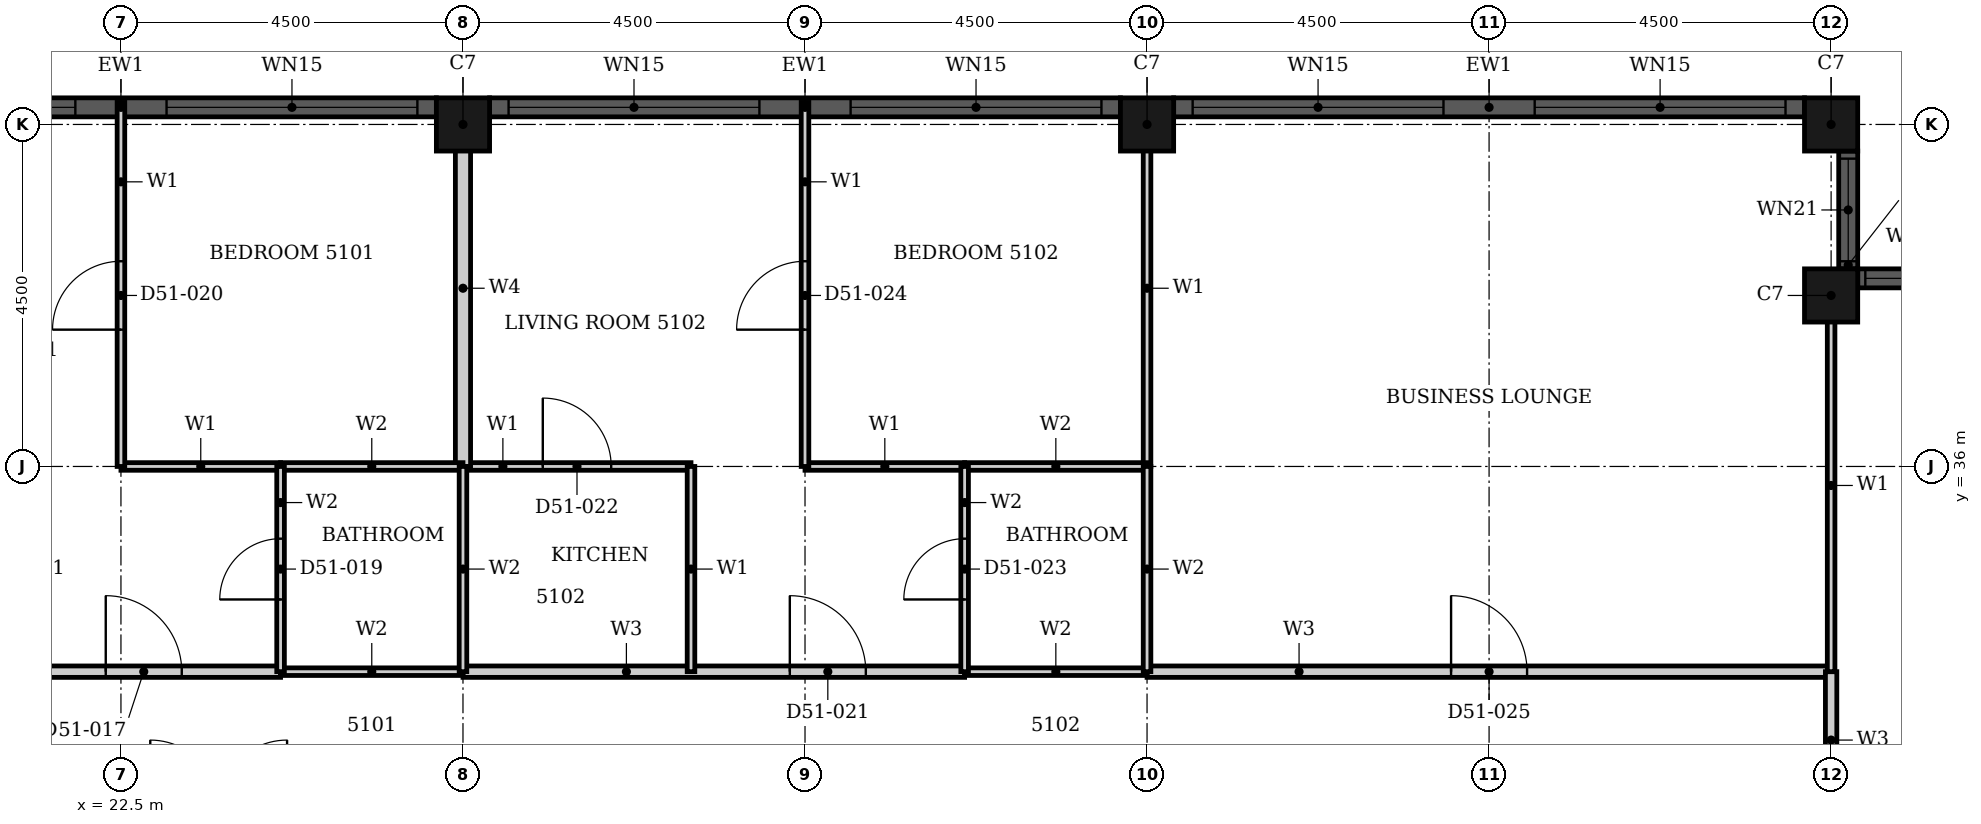
"""IFC4 building model, lengths in metres.
Left out: names, types, materials, properties, quantities, classifications, styles, units other than length and angle.
Written with IfcOpenShell. Run it as: python <this file> out.ifc"""

import sys

from ifc_helpers import new_model, si_unit, direction, frame, frame_2d, origin, origin_2d, place, context, subcontext, project, spatial, rectangle, hollow_rectangle, extrude, element, fill, save


model = new_model("IFC4")
c1 = context("Model", 3, precision=1e-05, world=origin(), true_north=direction((0.0, 1.0)))
c2 = subcontext(c1, "Body", "Model", "MODEL_VIEW")
j1 = project(units=[si_unit("LENGTHUNIT", "METRE"), si_unit("PLANEANGLEUNIT", "RADIAN")], contexts=[c1])
p1 = place(None, origin())
s1 = spatial("IfcSite", under=j1, at=p1, CompositionType="ELEMENT")
p2 = place(p1, origin())
s2 = spatial("IfcBuilding", under=s1, at=p2, CompositionType="ELEMENT")
p3 = place(p2, frame((0.0, 0.0, 203.5)))
s3 = spatial("IfcBuildingStorey", under=s2, at=p3, CompositionType="ELEMENT", Elevation=203.5)
for number, where, z_axis, x_axis in (
    (1, (45.0, 38.25, 0.0), (0.0, 0.0, 1.0), (1.0, 0.0, 0.0)),
    (2, (45.0, 40.5, 0.0), (0.0, 0.0, 1.0), (1.0, 0.0, 0.0)),
    (3, (36.0, 40.5, 0.0), (0.0, 0.0, 1.0), (1.0, 0.0, 0.0)),
    (4, (27.0, 40.5, 0.0), (0.0, 0.0, 1.0), (1.0, 0.0, 0.0)),
):
    element("IfcColumn", number, at=place(p3, frame(where, z_axis=z_axis, x_axis=x_axis)), inside=s3, PredefinedType="COLUMN", context=c2, shape_type="SweptSolid", body=[
        extrude(hollow_rectangle(XDim=0.7, YDim=0.7, WallThickness=0.022, at=origin_2d()), origin(), (0.0, 0.0, 1.0), 3.7),
    ])
p4 = place(p3, frame((46.9, 38.475, 0.0), z_axis=(0.0, 0.0, 1.0), x_axis=(-1.0, 0.0, 0.0)))
e5 = element("IfcWall", 5, at=p4, inside=s3, PredefinedType="SOLIDWALL", context=c2, shape_type="SweptSolid", body=[
    extrude(rectangle(XDim=1.55, YDim=0.25, at=frame_2d((0.775, 0.0))), origin(), (0.0, 0.0, 1.0), 3.7),
])
p5 = place(p4, frame((0.1, 0.0, 0.9)))
e6 = element("IfcOpeningElement", 6, at=p5, cuts=e5, PredefinedType="OPENING", context=c2, shape_type="SweptSolid", body=[
    extrude(rectangle(XDim=1.35, YDim=1.85, at=frame_2d((0.675, 0.925))), frame((0.0, 0.135, 0.0), z_axis=(0.0, -1.0, 0.0), x_axis=(1.0, 0.0, 0.0)), (0.0, 0.0, 1.0), 0.27),
])
p6 = place(p3, frame((45.225, 38.6, 0.0), z_axis=(0.0, 0.0, 1.0), x_axis=(0.0, 1.0, 0.0)))
e7 = element("IfcWall", 7, at=p6, inside=s3, PredefinedType="SOLIDWALL", context=c2, shape_type="SweptSolid", body=[
    extrude(rectangle(XDim=1.55, YDim=0.25, at=frame_2d((0.775, 0.0))), origin(), (0.0, 0.0, 1.0), 3.7),
])
p7 = place(p6, frame((0.1, 0.0, 0.9)))
e8 = element("IfcOpeningElement", 8, at=p7, cuts=e7, PredefinedType="OPENING", context=c2, shape_type="SweptSolid", body=[
    extrude(rectangle(XDim=1.35, YDim=1.85, at=frame_2d((0.675, 0.925))), frame((0.0, 0.135, 0.0), z_axis=(0.0, -1.0, 0.0), x_axis=(1.0, 0.0, 0.0)), (0.0, 0.0, 1.0), 0.27),
])
p8 = place(p3, frame((44.65, 40.725, 0.0), z_axis=(0.0, 0.0, 1.0), x_axis=(-1.0, 0.0, 0.0)))
e9 = element("IfcWall", 9, at=p8, inside=s3, PredefinedType="SOLIDWALL", context=c2, shape_type="SweptSolid", body=[
    extrude(rectangle(XDim=8.3, YDim=0.25, at=frame_2d((4.15, 0.0))), origin(), (0.0, 0.0, 1.0), 3.7),
])
p9 = place(p8, frame((0.25, 0.0, 0.45)))
e10 = element("IfcOpeningElement", 10, at=p9, cuts=e9, PredefinedType="OPENING", context=c2, shape_type="SweptSolid", body=[
    extrude(rectangle(XDim=3.3, YDim=2.3, at=frame_2d((1.65, 1.15))), frame((0.0, 0.135, 0.0), z_axis=(0.0, -1.0, 0.0), x_axis=(1.0, 0.0, 0.0)), (0.0, 0.0, 1.0), 0.27),
])
p10 = place(p8, frame((4.75, 0.0, 0.45)))
e11 = element("IfcOpeningElement", 11, at=p10, cuts=e9, PredefinedType="OPENING", context=c2, shape_type="SweptSolid", body=[
    extrude(rectangle(XDim=3.3, YDim=2.3, at=frame_2d((1.65, 1.15))), frame((0.0, 0.135, 0.0), z_axis=(0.0, -1.0, 0.0), x_axis=(1.0, 0.0, 0.0)), (0.0, 0.0, 1.0), 0.27),
])
p11 = place(p3, frame((35.65, 40.725, 0.0), z_axis=(0.0, 0.0, 1.0), x_axis=(-1.0, 0.0, 0.0)))
e12 = element("IfcWall", 12, at=p11, inside=s3, PredefinedType="SOLIDWALL", context=c2, shape_type="SweptSolid", body=[
    extrude(rectangle(XDim=8.3, YDim=0.25, at=frame_2d((4.15, 0.0))), origin(), (0.0, 0.0, 1.0), 3.7),
])
p12 = place(p11, frame((0.25, 0.0, 0.45)))
e13 = element("IfcOpeningElement", 13, at=p12, cuts=e12, PredefinedType="OPENING", context=c2, shape_type="SweptSolid", body=[
    extrude(rectangle(XDim=3.3, YDim=2.3, at=frame_2d((1.65, 1.15))), frame((0.0, 0.135, 0.0), z_axis=(0.0, -1.0, 0.0), x_axis=(1.0, 0.0, 0.0)), (0.0, 0.0, 1.0), 0.27),
])
p13 = place(p11, frame((4.75, 0.0, 0.45)))
e14 = element("IfcOpeningElement", 14, at=p13, cuts=e12, PredefinedType="OPENING", context=c2, shape_type="SweptSolid", body=[
    extrude(rectangle(XDim=3.3, YDim=2.3, at=frame_2d((1.65, 1.15))), frame((0.0, 0.135, 0.0), z_axis=(0.0, -1.0, 0.0), x_axis=(1.0, 0.0, 0.0)), (0.0, 0.0, 1.0), 0.27),
])
p14 = place(p3, frame((26.65, 40.725, 0.0), z_axis=(0.0, 0.0, 1.0), x_axis=(-1.0, 0.0, 0.0)))
e15 = element("IfcWall", 15, at=p14, inside=s3, PredefinedType="SOLIDWALL", context=c2, shape_type="SweptSolid", body=[
    extrude(rectangle(XDim=8.3, YDim=0.25, at=frame_2d((4.15, 0.0))), origin(), (0.0, 0.0, 1.0), 3.7),
])
p15 = place(p14, frame((0.25, 0.0, 0.45)))
e16 = element("IfcOpeningElement", 16, at=p15, cuts=e15, PredefinedType="OPENING", context=c2, shape_type="SweptSolid", body=[
    extrude(rectangle(XDim=3.3, YDim=2.3, at=frame_2d((1.65, 1.15))), frame((0.0, 0.135, 0.0), z_axis=(0.0, -1.0, 0.0), x_axis=(1.0, 0.0, 0.0)), (0.0, 0.0, 1.0), 0.27),
])
p16 = place(p14, frame((4.75, 0.0, 0.45)))
e17 = element("IfcOpeningElement", 17, at=p16, cuts=e15, PredefinedType="OPENING", context=c2, shape_type="SweptSolid", body=[
    extrude(rectangle(XDim=3.3, YDim=2.3, at=frame_2d((1.65, 1.15))), frame((0.0, 0.135, 0.0), z_axis=(0.0, -1.0, 0.0), x_axis=(1.0, 0.0, 0.0)), (0.0, 0.0, 1.0), 0.27),
])
p17 = place(p3, frame((18.0, 33.3, 0.0), z_axis=(0.0, 0.0, 1.0), x_axis=(1.0, 0.0, 0.0)))
e18 = element("IfcWall", 18, at=p17, inside=s3, PredefinedType="PARTITIONING", context=c2, shape_type="SweptSolid", body=[
    extrude(rectangle(XDim=6.6, YDim=0.15, at=frame_2d((3.3, 0.0))), origin(), (0.0, 0.0, 1.0), 3.4),
])
p18 = place(p17, frame((4.3, 0.0, 0.0)))
e19 = element("IfcOpeningElement", 19, at=p18, cuts=e18, PredefinedType="OPENING", context=c2, shape_type="SweptSolid", body=[
    extrude(rectangle(XDim=1.0, YDim=2.2, at=frame_2d((0.5, 1.1))), frame((0.0, 0.085, 0.0), z_axis=(0.0, -1.0, 0.0), x_axis=(1.0, 0.0, 0.0)), (0.0, 0.0, 1.0), 0.17),
])
p19 = place(p3, frame((27.0, 33.3, 0.0), z_axis=(0.0, 0.0, 1.0), x_axis=(1.0, 0.0, 0.0)))
e20 = element("IfcWall", 20, at=p19, inside=s3, PredefinedType="PARTITIONING", context=c2, shape_type="SweptSolid", body=[
    extrude(rectangle(XDim=6.6, YDim=0.15, at=frame_2d((3.3, 0.0))), origin(), (0.0, 0.0, 1.0), 3.4),
])
p20 = place(p19, frame((4.3, 0.0, 0.0)))
e21 = element("IfcOpeningElement", 21, at=p20, cuts=e20, PredefinedType="OPENING", context=c2, shape_type="SweptSolid", body=[
    extrude(rectangle(XDim=1.0, YDim=2.2, at=frame_2d((0.5, 1.1))), frame((0.0, 0.085, 0.0), z_axis=(0.0, -1.0, 0.0), x_axis=(1.0, 0.0, 0.0)), (0.0, 0.0, 1.0), 0.17),
])
p21 = place(p3, frame((36.0, 33.3, 0.0), z_axis=(0.0, 0.0, 1.0), x_axis=(1.0, 0.0, 0.0)))
e22 = element("IfcWall", 22, at=p21, inside=s3, PredefinedType="PARTITIONING", context=c2, shape_type="SweptSolid", body=[
    extrude(rectangle(XDim=9.0, YDim=0.15, at=frame_2d((4.5, 0.0))), origin(), (0.0, 0.0, 1.0), 3.4),
])
p22 = place(p21, frame((4.0, 0.0, 0.0)))
e23 = element("IfcOpeningElement", 23, at=p22, cuts=e22, PredefinedType="OPENING", context=c2, shape_type="SweptSolid", body=[
    extrude(rectangle(XDim=1.0, YDim=2.1, at=frame_2d((0.5, 1.05))), frame((0.0, 0.085, 0.0), z_axis=(0.0, -1.0, 0.0), x_axis=(1.0, 0.0, 0.0)), (0.0, 0.0, 1.0), 0.17),
])
p23 = place(p3, frame((45.0, 31.5, 0.0), z_axis=(0.0, 0.0, 1.0), x_axis=(0.0, 1.0, 0.0)))
e24 = element("IfcWall", 24, at=p23, inside=s3, PredefinedType="PARTITIONING", context=c2, shape_type="SweptSolid", body=[
    extrude(rectangle(XDim=1.8, YDim=0.15, at=frame_2d((0.9, 0.0))), origin(), (0.0, 0.0, 1.0), 3.4),
])
for number, where, z_axis, x_axis in (
    (25, (22.5, 36.0, 0.0), (0.0, 0.0, 1.0), (1.0, 0.0, 0.0)),
    (26, (31.5, 36.0, 0.0), (0.0, 0.0, 1.0), (1.0, 0.0, 0.0)),
):
    element("IfcWall", number, at=place(p3, frame(where, z_axis=z_axis, x_axis=x_axis)), inside=s3, PredefinedType="PARTITIONING", context=c2, shape_type="SweptSolid", body=[
        extrude(rectangle(XDim=2.1, YDim=0.1, at=frame_2d((1.05, 0.0))), origin(), (0.0, 0.0, 1.0), 3.4),
    ])
p24 = place(p3, frame((27.0, 36.0, 0.0), z_axis=(0.0, 0.0, 1.0), x_axis=(1.0, 0.0, 0.0)))
e27 = element("IfcWall", 27, at=p24, inside=s3, PredefinedType="PARTITIONING", context=c2, shape_type="SweptSolid", body=[
    extrude(rectangle(XDim=3.0, YDim=0.1, at=frame_2d((1.5, 0.0))), origin(), (0.0, 0.0, 1.0), 3.4),
])
p25 = place(p24, frame((1.05, 0.0, 0.0)))
e28 = element("IfcOpeningElement", 28, at=p25, cuts=e27, PredefinedType="OPENING", context=c2, shape_type="SweptSolid", body=[
    extrude(rectangle(XDim=0.9, YDim=2.1, at=frame_2d((0.45, 1.05))), frame((0.0, 0.06, 0.0), z_axis=(0.0, -1.0, 0.0), x_axis=(1.0, 0.0, 0.0)), (0.0, 0.0, 1.0), 0.12),
])
p26 = place(p3, frame((22.5, 36.0, 0.0), z_axis=(0.0, 0.0, 1.0), x_axis=(0.0, 1.0, 0.0)))
e29 = element("IfcWall", 29, at=p26, inside=s3, PredefinedType="PARTITIONING", context=c2, shape_type="SweptSolid", body=[
    extrude(rectangle(XDim=4.79, YDim=0.1, at=frame_2d((2.395, 0.0))), origin(), (0.0, 0.0, 1.0), 3.4),
])
p27 = place(p26, frame((1.8, 0.0, 0.0)))
e30 = element("IfcOpeningElement", 30, at=p27, cuts=e29, PredefinedType="OPENING", context=c2, shape_type="SweptSolid", body=[
    extrude(rectangle(XDim=0.9, YDim=2.1, at=frame_2d((0.45, 1.05))), frame((0.0, 0.06, 0.0), z_axis=(0.0, -1.0, 0.0), x_axis=(1.0, 0.0, 0.0)), (0.0, 0.0, 1.0), 0.12),
])
p28 = place(p3, frame((30.0, 33.3, 0.0), z_axis=(0.0, 0.0, 1.0), x_axis=(0.0, 1.0, 0.0)))
e31 = element("IfcWall", 31, at=p28, inside=s3, PredefinedType="PARTITIONING", context=c2, shape_type="SweptSolid", body=[
    extrude(rectangle(XDim=2.7, YDim=0.1, at=frame_2d((1.35, 0.0))), origin(), (0.0, 0.0, 1.0), 3.4),
])
p29 = place(p3, frame((31.5, 36.0, 0.0), z_axis=(0.0, 0.0, 1.0), x_axis=(0.0, 1.0, 0.0)))
e32 = element("IfcWall", 32, at=p29, inside=s3, PredefinedType="PARTITIONING", context=c2, shape_type="SweptSolid", body=[
    extrude(rectangle(XDim=4.79, YDim=0.1, at=frame_2d((2.395, 0.0))), origin(), (0.0, 0.0, 1.0), 3.4),
])
p30 = place(p29, frame((1.8, 0.0, 0.0)))
e33 = element("IfcOpeningElement", 33, at=p30, cuts=e32, PredefinedType="OPENING", context=c2, shape_type="SweptSolid", body=[
    extrude(rectangle(XDim=0.9, YDim=2.1, at=frame_2d((0.45, 1.05))), frame((0.0, 0.06, 0.0), z_axis=(0.0, -1.0, 0.0), x_axis=(1.0, 0.0, 0.0)), (0.0, 0.0, 1.0), 0.12),
])
p31 = place(p3, frame((36.0, 36.0, 0.0), z_axis=(0.0, 0.0, 1.0), x_axis=(0.0, 1.0, 0.0)))
e34 = element("IfcWall", 34, at=p31, inside=s3, PredefinedType="PARTITIONING", context=c2, shape_type="SweptSolid", body=[
    extrude(rectangle(XDim=4.69, YDim=0.1, at=frame_2d((2.345, 0.0))), origin(), (0.0, 0.0, 1.0), 3.4),
])
p32 = place(p3, frame((45.0, 33.3, 0.0), z_axis=(0.0, 0.0, 1.0), x_axis=(0.0, 1.0, 0.0)))
e35 = element("IfcWall", 35, at=p32, inside=s3, PredefinedType="PARTITIONING", context=c2, shape_type="SweptSolid", body=[
    extrude(rectangle(XDim=4.9, YDim=0.1, at=frame_2d((2.45, 0.0))), origin(), (0.0, 0.0, 1.0), 3.4),
])
p33 = place(p3, frame((27.0, 36.0, 0.0), z_axis=(0.0, 0.0, 1.0), x_axis=(0.0, 1.0, 0.0)))
e36 = element("IfcWall", 36, at=p33, inside=s3, PredefinedType="PARTITIONING", context=c2, shape_type="SweptSolid", body=[
    extrude(rectangle(XDim=4.69, YDim=0.2, at=frame_2d((2.345, 0.0))), origin(), (0.0, 0.0, 1.0), 3.4),
])
for number, where, z_axis, x_axis in (
    (37, (24.6, 33.3, 0.0), (0.0, 0.0, 1.0), (1.0, 0.0, 0.0)),
    (38, (33.6, 33.3, 0.0), (0.0, 0.0, 1.0), (1.0, 0.0, 0.0)),
    (39, (24.6, 36.0, 0.0), (0.0, 0.0, 1.0), (1.0, 0.0, 0.0)),
    (40, (33.6, 36.0, 0.0), (0.0, 0.0, 1.0), (1.0, 0.0, 0.0)),
):
    element("IfcWall", number, at=place(p3, frame(where, z_axis=z_axis, x_axis=x_axis)), inside=s3, PredefinedType="PARTITIONING", context=c2, shape_type="SweptSolid", body=[
        extrude(rectangle(XDim=2.4, YDim=0.1, at=frame_2d((1.2, 0.0))), origin(), (0.0, 0.0, 1.0), 3.4),
    ])
p34 = place(p3, frame((24.6, 33.3, 0.0), z_axis=(0.0, 0.0, 1.0), x_axis=(0.0, 1.0, 0.0)))
e41 = element("IfcWall", 41, at=p34, inside=s3, PredefinedType="PARTITIONING", context=c2, shape_type="SweptSolid", body=[
    extrude(rectangle(XDim=2.7, YDim=0.1, at=frame_2d((1.35, 0.0))), origin(), (0.0, 0.0, 1.0), 3.4),
])
p35 = place(p34, frame((0.95, 0.0, 0.0)))
e42 = element("IfcOpeningElement", 42, at=p35, cuts=e41, PredefinedType="OPENING", context=c2, shape_type="SweptSolid", body=[
    extrude(rectangle(XDim=0.8, YDim=2.1, at=frame_2d((0.4, 1.05))), frame((0.0, 0.06, 0.0), z_axis=(0.0, -1.0, 0.0), x_axis=(1.0, 0.0, 0.0)), (0.0, 0.0, 1.0), 0.12),
])
p36 = place(p3, frame((27.0, 33.3, 0.0), z_axis=(0.0, 0.0, 1.0), x_axis=(0.0, 1.0, 0.0)))
e43 = element("IfcWall", 43, at=p36, inside=s3, PredefinedType="PARTITIONING", context=c2, shape_type="SweptSolid", body=[
    extrude(rectangle(XDim=2.7, YDim=0.1, at=frame_2d((1.35, 0.0))), origin(), (0.0, 0.0, 1.0), 3.4),
])
p37 = place(p3, frame((33.6, 33.3, 0.0), z_axis=(0.0, 0.0, 1.0), x_axis=(0.0, 1.0, 0.0)))
e44 = element("IfcWall", 44, at=p37, inside=s3, PredefinedType="PARTITIONING", context=c2, shape_type="SweptSolid", body=[
    extrude(rectangle(XDim=2.7, YDim=0.1, at=frame_2d((1.35, 0.0))), origin(), (0.0, 0.0, 1.0), 3.4),
])
p38 = place(p37, frame((0.95, 0.0, 0.0)))
e45 = element("IfcOpeningElement", 45, at=p38, cuts=e44, PredefinedType="OPENING", context=c2, shape_type="SweptSolid", body=[
    extrude(rectangle(XDim=0.8, YDim=2.1, at=frame_2d((0.4, 1.05))), frame((0.0, 0.06, 0.0), z_axis=(0.0, -1.0, 0.0), x_axis=(1.0, 0.0, 0.0)), (0.0, 0.0, 1.0), 0.12),
])
p39 = place(p3, frame((36.0, 33.3, 0.0), z_axis=(0.0, 0.0, 1.0), x_axis=(0.0, 1.0, 0.0)))
e46 = element("IfcWall", 46, at=p39, inside=s3, PredefinedType="PARTITIONING", context=c2, shape_type="SweptSolid", body=[
    extrude(rectangle(XDim=2.7, YDim=0.1, at=frame_2d((1.35, 0.0))), origin(), (0.0, 0.0, 1.0), 3.4),
])
p40 = place(p5, origin())
e47 = element("IfcWindow", 47, at=p40, inside=s3, PartitioningType="SINGLE_PANEL", PredefinedType="WINDOW", context=c2, shape_type="SweptSolid", body=[
    extrude(rectangle(XDim=1.35, YDim=1.85, at=frame_2d((0.675, 0.925))), frame((0.0, 0.03, 0.0), z_axis=(0.0, -1.0, 0.0), x_axis=(1.0, 0.0, 0.0)), (0.0, 0.0, 1.0), 0.06),
])
fill(e6, e47)
p41 = place(p7, origin())
e48 = element("IfcWindow", 48, at=p41, inside=s3, PartitioningType="SINGLE_PANEL", PredefinedType="WINDOW", context=c2, shape_type="SweptSolid", body=[
    extrude(rectangle(XDim=1.35, YDim=1.85, at=frame_2d((0.675, 0.925))), frame((0.0, 0.03, 0.0), z_axis=(0.0, -1.0, 0.0), x_axis=(1.0, 0.0, 0.0)), (0.0, 0.0, 1.0), 0.06),
])
fill(e8, e48)
p42 = place(p9, origin())
e49 = element("IfcWindow", 49, at=p42, inside=s3, PartitioningType="SINGLE_PANEL", PredefinedType="WINDOW", context=c2, shape_type="SweptSolid", body=[
    extrude(rectangle(XDim=3.3, YDim=2.3, at=frame_2d((1.65, 1.15))), frame((0.0, 0.03, 0.0), z_axis=(0.0, -1.0, 0.0), x_axis=(1.0, 0.0, 0.0)), (0.0, 0.0, 1.0), 0.06),
])
fill(e10, e49)
p43 = place(p10, origin())
e50 = element("IfcWindow", 50, at=p43, inside=s3, PartitioningType="SINGLE_PANEL", PredefinedType="WINDOW", context=c2, shape_type="SweptSolid", body=[
    extrude(rectangle(XDim=3.3, YDim=2.3, at=frame_2d((1.65, 1.15))), frame((0.0, 0.03, 0.0), z_axis=(0.0, -1.0, 0.0), x_axis=(1.0, 0.0, 0.0)), (0.0, 0.0, 1.0), 0.06),
])
fill(e11, e50)
p44 = place(p12, origin())
e51 = element("IfcWindow", 51, at=p44, inside=s3, PartitioningType="SINGLE_PANEL", PredefinedType="WINDOW", context=c2, shape_type="SweptSolid", body=[
    extrude(rectangle(XDim=3.3, YDim=2.3, at=frame_2d((1.65, 1.15))), frame((0.0, 0.03, 0.0), z_axis=(0.0, -1.0, 0.0), x_axis=(1.0, 0.0, 0.0)), (0.0, 0.0, 1.0), 0.06),
])
fill(e13, e51)
p45 = place(p13, origin())
e52 = element("IfcWindow", 52, at=p45, inside=s3, PartitioningType="SINGLE_PANEL", PredefinedType="WINDOW", context=c2, shape_type="SweptSolid", body=[
    extrude(rectangle(XDim=3.3, YDim=2.3, at=frame_2d((1.65, 1.15))), frame((0.0, 0.03, 0.0), z_axis=(0.0, -1.0, 0.0), x_axis=(1.0, 0.0, 0.0)), (0.0, 0.0, 1.0), 0.06),
])
fill(e14, e52)
p46 = place(p15, origin())
e53 = element("IfcWindow", 53, at=p46, inside=s3, PartitioningType="SINGLE_PANEL", PredefinedType="WINDOW", context=c2, shape_type="SweptSolid", body=[
    extrude(rectangle(XDim=3.3, YDim=2.3, at=frame_2d((1.65, 1.15))), frame((0.0, 0.03, 0.0), z_axis=(0.0, -1.0, 0.0), x_axis=(1.0, 0.0, 0.0)), (0.0, 0.0, 1.0), 0.06),
])
fill(e16, e53)
p47 = place(p16, origin())
e54 = element("IfcWindow", 54, at=p47, inside=s3, PartitioningType="SINGLE_PANEL", PredefinedType="WINDOW", context=c2, shape_type="SweptSolid", body=[
    extrude(rectangle(XDim=3.3, YDim=2.3, at=frame_2d((1.65, 1.15))), frame((0.0, 0.03, 0.0), z_axis=(0.0, -1.0, 0.0), x_axis=(1.0, 0.0, 0.0)), (0.0, 0.0, 1.0), 0.06),
])
fill(e17, e54)
p48 = place(p18, origin())
e55 = element("IfcDoor", 55, at=p48, inside=s3, OperationType="SINGLE_SWING_LEFT", PredefinedType="DOOR", context=c2, shape_type="SweptSolid", body=[
    extrude(rectangle(XDim=1.0, YDim=2.2, at=frame_2d((0.5, 1.1))), frame((0.0, 0.025, 0.0), z_axis=(0.0, -1.0, 0.0), x_axis=(1.0, 0.0, 0.0)), (0.0, 0.0, 1.0), 0.05),
])
fill(e19, e55)
p49 = place(p35, origin())
e56 = element("IfcDoor", 56, at=p49, inside=s3, OperationType="SINGLE_SWING_LEFT", PredefinedType="DOOR", context=c2, shape_type="SweptSolid", body=[
    extrude(rectangle(XDim=0.8, YDim=2.1, at=frame_2d((0.4, 1.05))), frame((0.0, 0.025, 0.0), z_axis=(0.0, -1.0, 0.0), x_axis=(1.0, 0.0, 0.0)), (0.0, 0.0, 1.0), 0.05),
])
fill(e42, e56)
p50 = place(p27, origin())
e57 = element("IfcDoor", 57, at=p50, inside=s3, OperationType="SINGLE_SWING_RIGHT", PredefinedType="DOOR", context=c2, shape_type="SweptSolid", body=[
    extrude(rectangle(XDim=0.9, YDim=2.1, at=frame_2d((0.45, 1.05))), frame((0.0, 0.025, 0.0), z_axis=(0.0, -1.0, 0.0), x_axis=(1.0, 0.0, 0.0)), (0.0, 0.0, 1.0), 0.05),
])
fill(e30, e57)
p51 = place(p20, origin())
e58 = element("IfcDoor", 58, at=p51, inside=s3, OperationType="SINGLE_SWING_LEFT", PredefinedType="DOOR", context=c2, shape_type="SweptSolid", body=[
    extrude(rectangle(XDim=1.0, YDim=2.2, at=frame_2d((0.5, 1.1))), frame((0.0, 0.025, 0.0), z_axis=(0.0, -1.0, 0.0), x_axis=(1.0, 0.0, 0.0)), (0.0, 0.0, 1.0), 0.05),
])
fill(e21, e58)
p52 = place(p25, origin())
e59 = element("IfcDoor", 59, at=p52, inside=s3, OperationType="SINGLE_SWING_LEFT", PredefinedType="DOOR", context=c2, shape_type="SweptSolid", body=[
    extrude(rectangle(XDim=0.9, YDim=2.1, at=frame_2d((0.45, 1.05))), frame((0.0, 0.025, 0.0), z_axis=(0.0, -1.0, 0.0), x_axis=(1.0, 0.0, 0.0)), (0.0, 0.0, 1.0), 0.05),
])
fill(e28, e59)
p53 = place(p38, origin())
e60 = element("IfcDoor", 60, at=p53, inside=s3, OperationType="SINGLE_SWING_RIGHT", PredefinedType="DOOR", context=c2, shape_type="SweptSolid", body=[
    extrude(rectangle(XDim=0.8, YDim=2.1, at=frame_2d((0.4, 1.05))), frame((0.0, 0.025, 0.0), z_axis=(0.0, -1.0, 0.0), x_axis=(1.0, 0.0, 0.0)), (0.0, 0.0, 1.0), 0.05),
])
fill(e45, e60)
p54 = place(p30, origin())
e61 = element("IfcDoor", 61, at=p54, inside=s3, OperationType="SINGLE_SWING_LEFT", PredefinedType="DOOR", context=c2, shape_type="SweptSolid", body=[
    extrude(rectangle(XDim=0.9, YDim=2.1, at=frame_2d((0.45, 1.05))), frame((0.0, 0.025, 0.0), z_axis=(0.0, -1.0, 0.0), x_axis=(1.0, 0.0, 0.0)), (0.0, 0.0, 1.0), 0.05),
])
fill(e33, e61)
p55 = place(p22, origin())
e62 = element("IfcDoor", 62, at=p55, inside=s3, OperationType="SINGLE_SWING_LEFT", PredefinedType="DOOR", context=c2, shape_type="SweptSolid", body=[
    extrude(rectangle(XDim=1.0, YDim=2.1, at=frame_2d((0.5, 1.05))), frame((0.0, 0.025, 0.0), z_axis=(0.0, -1.0, 0.0), x_axis=(1.0, 0.0, 0.0)), (0.0, 0.0, 1.0), 0.05),
])
fill(e23, e62)
save(model, sys.argv[1])
